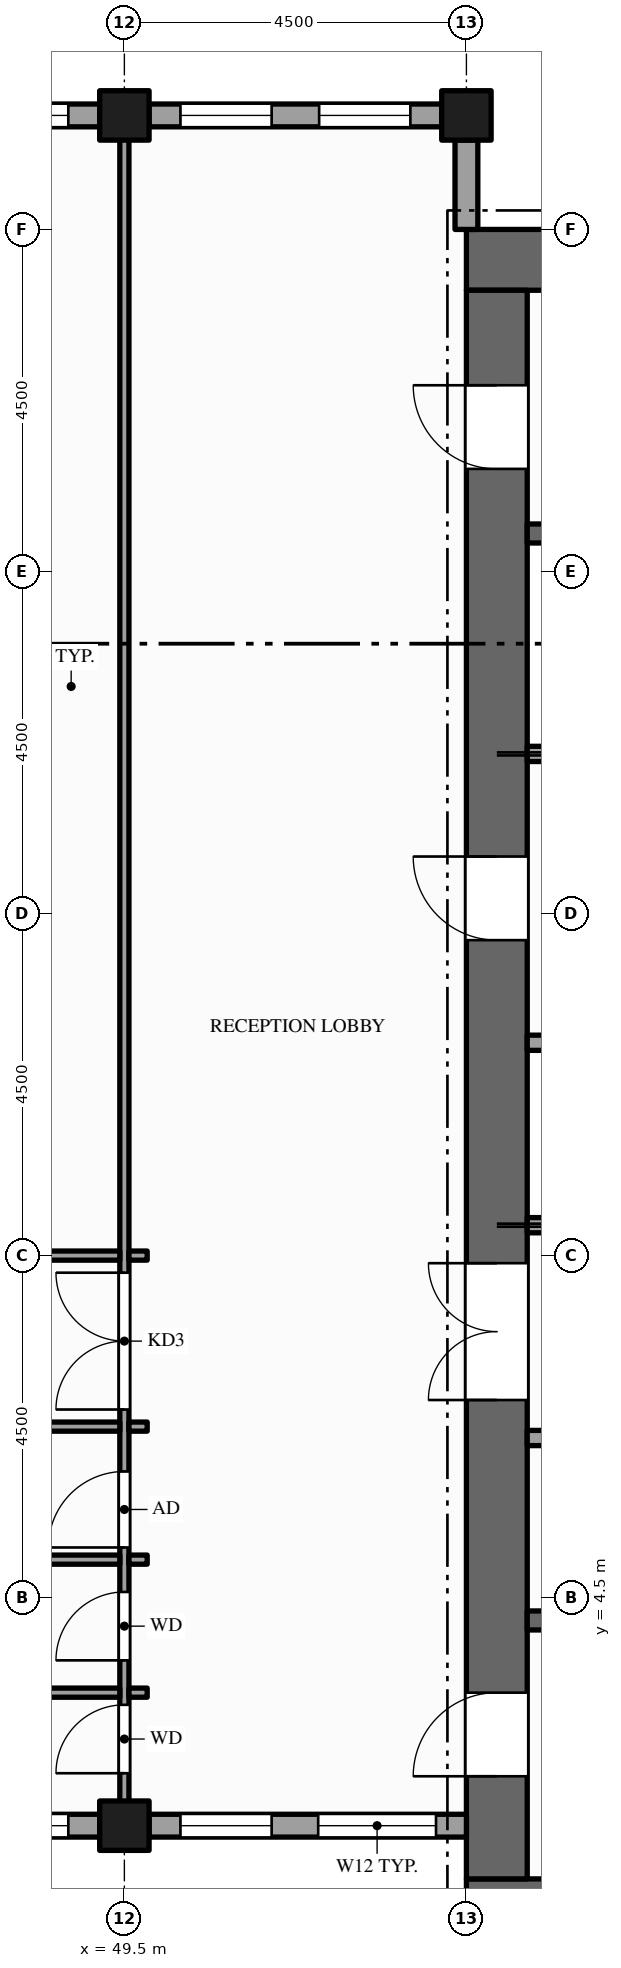
"""IFC4 building model, lengths in metres.
Left out: names, types, materials, properties, quantities, classifications, styles, units other than length and angle.
Written with IfcOpenShell. Run it as: python <this file> out.ifc"""

import sys

from ifc_helpers import new_model, si_unit, direction, frame, frame_2d, origin, origin_2d, place, context, subcontext, project, spatial, rectangle, hollow_rectangle, extrude, element, fill, save


model = new_model("IFC4")
c1 = context("Model", 3, precision=1e-05, world=origin(), true_north=direction((0.0, 1.0)))
c2 = subcontext(c1, "Body", "Model", "MODEL_VIEW")
j1 = project(units=[si_unit("LENGTHUNIT", "METRE"), si_unit("PLANEANGLEUNIT", "RADIAN")], contexts=[c1])
p1 = place(None, origin())
s1 = spatial("IfcSite", under=j1, at=p1, CompositionType="ELEMENT")
p2 = place(p1, origin())
s2 = spatial("IfcBuilding", under=s1, at=p2, CompositionType="ELEMENT")
p3 = place(p2, frame((0.0, 0.0, 269.0)))
s3 = spatial("IfcBuildingStorey", under=s2, at=p3, CompositionType="ELEMENT", Elevation=269.0)
for number, where, z_axis, x_axis in (
    (1, (67.5, 0.4, -0.15), (0.0, 0.0, 1.0), (-1.0, 0.0, 0.0)),
    (2, (54.0, 22.1, -0.15), (0.0, 0.0, 1.0), (1.0, 0.0, 0.0)),
):
    element("IfcWall", number, at=place(p3, frame(where, z_axis=z_axis, x_axis=x_axis)), inside=s3, PredefinedType="SHEAR", context=c2, shape_type="SweptSolid", body=[
        extrude(rectangle(XDim=13.5, YDim=0.8, at=frame_2d((6.75, 0.0))), origin(), (0.0, 0.0, 1.0), 4.0),
    ])
p4 = place(p3, frame((54.4, 0.8, -0.15), z_axis=(0.0, 0.0, 1.0), x_axis=(0.0, 1.0, 0.0)))
e3 = element("IfcWall", 3, at=p4, inside=s3, PredefinedType="SHEAR", context=c2, shape_type="SweptSolid", body=[
    extrude(rectangle(XDim=20.9, YDim=0.8, at=frame_2d((10.45, 0.0))), origin(), (0.0, 0.0, 1.0), 4.0),
])
p5 = place(p4, frame((6.3, 0.0, 0.15)))
e4 = element("IfcOpeningElement", 4, at=p5, cuts=e3, PredefinedType="OPENING", context=c2, shape_type="SweptSolid", body=[
    extrude(rectangle(XDim=1.8, YDim=2.1, at=frame_2d((0.9, 1.05))), frame((0.0, 0.41, 0.0), z_axis=(0.0, -1.0, 0.0), x_axis=(1.0, 0.0, 0.0)), (0.0, 0.0, 1.0), 0.82),
])
p6 = place(p4, frame((12.35, 0.0, 0.15)))
e5 = element("IfcOpeningElement", 5, at=p6, cuts=e3, PredefinedType="OPENING", context=c2, shape_type="SweptSolid", body=[
    extrude(rectangle(XDim=1.1, YDim=2.1, at=frame_2d((0.55, 1.05))), frame((0.0, 0.41, 0.0), z_axis=(0.0, -1.0, 0.0), x_axis=(1.0, 0.0, 0.0)), (0.0, 0.0, 1.0), 0.82),
])
p7 = place(p4, frame((1.35, 0.0, 0.15)))
e6 = element("IfcOpeningElement", 6, at=p7, cuts=e3, PredefinedType="OPENING", context=c2, shape_type="SweptSolid", body=[
    extrude(rectangle(XDim=1.1, YDim=2.1, at=frame_2d((0.55, 1.05))), frame((0.0, 0.41, 0.0), z_axis=(0.0, -1.0, 0.0), x_axis=(1.0, 0.0, 0.0)), (0.0, 0.0, 1.0), 0.82),
])
p8 = place(p4, frame((18.55, 0.0, 0.15)))
e7 = element("IfcOpeningElement", 7, at=p8, cuts=e3, PredefinedType="OPENING", context=c2, shape_type="SweptSolid", body=[
    extrude(rectangle(XDim=1.1, YDim=2.1, at=frame_2d((0.55, 1.05))), frame((0.0, 0.41, 0.0), z_axis=(0.0, -1.0, 0.0), x_axis=(1.0, 0.0, 0.0)), (0.0, 0.0, 1.0), 0.82),
])
for number, where, z_axis, x_axis in (
    (8, (49.5, 1.5, -0.15), (0.0, 0.0, 1.0), (1.0, 0.0, 0.0)),
    (9, (49.5, 24.0, -0.15), (0.0, 0.0, 1.0), (1.0, 0.0, 0.0)),
    (10, (54.0, 24.0, -0.15), (0.0, 0.0, 1.0), (1.0, 0.0, 0.0)),
):
    element("IfcColumn", number, at=place(p3, frame(where, z_axis=z_axis, x_axis=x_axis)), inside=s3, PredefinedType="COLUMN", context=c2, shape_type="SweptSolid", body=[
        extrude(hollow_rectangle(XDim=0.65, YDim=0.65, WallThickness=0.032, at=origin_2d()), origin(), (0.0, 0.0, 1.0), 4.0),
    ])
p9 = place(p3, frame((45.325, 1.5, 0.0), z_axis=(0.0, 0.0, 1.0), x_axis=(1.0, 0.0, 0.0)))
e11 = element("IfcWall", 11, at=p9, inside=s3, PredefinedType="STANDARD", context=c2, shape_type="SweptSolid", body=[
    extrude(rectangle(XDim=3.85, YDim=0.3, at=frame_2d((1.925, 0.0))), origin(), (0.0, 0.0, 1.0), 2.87),
])
p10 = place(p9, frame((0.413, 0.0, 0.9)))
e12 = element("IfcOpeningElement", 12, at=p10, cuts=e11, PredefinedType="OPENING", context=c2, shape_type="SweptSolid", body=[
    extrude(rectangle(XDim=1.2, YDim=1.75, at=frame_2d((0.6, 0.875))), frame((0.0, 0.16, 0.0), z_axis=(0.0, -1.0, 0.0), x_axis=(1.0, 0.0, 0.0)), (0.0, 0.0, 1.0), 0.32),
])
p11 = place(p9, frame((2.238, 0.0, 0.9)))
e13 = element("IfcOpeningElement", 13, at=p11, cuts=e11, PredefinedType="OPENING", context=c2, shape_type="SweptSolid", body=[
    extrude(rectangle(XDim=1.2, YDim=1.75, at=frame_2d((0.6, 0.875))), frame((0.0, 0.16, 0.0), z_axis=(0.0, -1.0, 0.0), x_axis=(1.0, 0.0, 0.0)), (0.0, 0.0, 1.0), 0.32),
])
p12 = place(p3, frame((49.825, 1.5, 0.0), z_axis=(0.0, 0.0, 1.0), x_axis=(1.0, 0.0, 0.0)))
e14 = element("IfcWall", 14, at=p12, inside=s3, PredefinedType="STANDARD", context=c2, shape_type="SweptSolid", body=[
    extrude(rectangle(XDim=4.175, YDim=0.3, at=frame_2d((2.087, 0.0))), origin(), (0.0, 0.0, 1.0), 2.87),
])
p13 = place(p12, frame((0.413, 0.0, 0.9)))
e15 = element("IfcOpeningElement", 15, at=p13, cuts=e14, PredefinedType="OPENING", context=c2, shape_type="SweptSolid", body=[
    extrude(rectangle(XDim=1.2, YDim=1.75, at=frame_2d((0.6, 0.875))), frame((0.0, 0.16, 0.0), z_axis=(0.0, -1.0, 0.0), x_axis=(1.0, 0.0, 0.0)), (0.0, 0.0, 1.0), 0.32),
])
p14 = place(p12, frame((2.225, 0.0, 0.9)))
e16 = element("IfcOpeningElement", 16, at=p14, cuts=e14, PredefinedType="OPENING", context=c2, shape_type="SweptSolid", body=[
    extrude(rectangle(XDim=1.55, YDim=1.75, at=frame_2d((0.775, 0.875))), frame((0.0, 0.16, 0.0), z_axis=(0.0, -1.0, 0.0), x_axis=(1.0, 0.0, 0.0)), (0.0, 0.0, 1.0), 0.32),
])
p15 = place(p3, frame((54.0, 22.5, 0.0), z_axis=(0.0, 0.0, 1.0), x_axis=(0.0, 1.0, 0.0)))
e17 = element("IfcWall", 17, at=p15, inside=s3, PredefinedType="STANDARD", context=c2, shape_type="SweptSolid", body=[
    extrude(rectangle(XDim=1.175, YDim=0.3, at=frame_2d((0.587, 0.0))), origin(), (0.0, 0.0, 1.0), 3.162),
])
p16 = place(p3, frame((53.675, 24.0, 0.0), z_axis=(0.0, 0.0, 1.0), x_axis=(-1.0, 0.0, 0.0)))
e18 = element("IfcWall", 18, at=p16, inside=s3, PredefinedType="STANDARD", context=c2, shape_type="SweptSolid", body=[
    extrude(rectangle(XDim=3.85, YDim=0.3, at=frame_2d((1.925, 0.0))), origin(), (0.0, 0.0, 1.0), 2.87),
])
p17 = place(p16, frame((0.413, 0.0, 0.9)))
e19 = element("IfcOpeningElement", 19, at=p17, cuts=e18, PredefinedType="OPENING", context=c2, shape_type="SweptSolid", body=[
    extrude(rectangle(XDim=1.2, YDim=1.75, at=frame_2d((0.6, 0.875))), frame((0.0, 0.16, 0.0), z_axis=(0.0, -1.0, 0.0), x_axis=(1.0, 0.0, 0.0)), (0.0, 0.0, 1.0), 0.32),
])
p18 = place(p16, frame((2.238, 0.0, 0.9)))
e20 = element("IfcOpeningElement", 20, at=p18, cuts=e18, PredefinedType="OPENING", context=c2, shape_type="SweptSolid", body=[
    extrude(rectangle(XDim=1.2, YDim=1.75, at=frame_2d((0.6, 0.875))), frame((0.0, 0.16, 0.0), z_axis=(0.0, -1.0, 0.0), x_axis=(1.0, 0.0, 0.0)), (0.0, 0.0, 1.0), 0.32),
])
p19 = place(p3, frame((49.175, 24.0, 0.0), z_axis=(0.0, 0.0, 1.0), x_axis=(-1.0, 0.0, 0.0)))
e21 = element("IfcWall", 21, at=p19, inside=s3, PredefinedType="STANDARD", context=c2, shape_type="SweptSolid", body=[
    extrude(rectangle(XDim=3.85, YDim=0.3, at=frame_2d((1.925, 0.0))), origin(), (0.0, 0.0, 1.0), 2.87),
])
p20 = place(p19, frame((0.413, 0.0, 0.9)))
e22 = element("IfcOpeningElement", 22, at=p20, cuts=e21, PredefinedType="OPENING", context=c2, shape_type="SweptSolid", body=[
    extrude(rectangle(XDim=1.2, YDim=1.75, at=frame_2d((0.6, 0.875))), frame((0.0, 0.16, 0.0), z_axis=(0.0, -1.0, 0.0), x_axis=(1.0, 0.0, 0.0)), (0.0, 0.0, 1.0), 0.32),
])
p21 = place(p19, frame((2.238, 0.0, 0.9)))
e23 = element("IfcOpeningElement", 23, at=p21, cuts=e21, PredefinedType="OPENING", context=c2, shape_type="SweptSolid", body=[
    extrude(rectangle(XDim=1.2, YDim=1.75, at=frame_2d((0.6, 0.875))), frame((0.0, 0.16, 0.0), z_axis=(0.0, -1.0, 0.0), x_axis=(1.0, 0.0, 0.0)), (0.0, 0.0, 1.0), 0.32),
])
p22 = place(p3, frame((49.5, 1.65, 0.0), z_axis=(0.0, 0.0, 1.0), x_axis=(0.0, 1.0, 0.0)))
e24 = element("IfcWall", 24, at=p22, inside=s3, PredefinedType="PARTITIONING", context=c2, shape_type="SweptSolid", body=[
    extrude(rectangle(XDim=22.2, YDim=0.12, at=frame_2d((11.1, 0.0))), origin(), (0.0, 0.0, 1.0), 2.87),
])
p23 = place(p22, frame((5.325, 0.0, 0.0)))
e25 = element("IfcOpeningElement", 25, at=p23, cuts=e24, PredefinedType="OPENING", context=c2, shape_type="SweptSolid", body=[
    extrude(rectangle(XDim=1.8, YDim=2.1, at=frame_2d((0.9, 1.05))), frame((0.0, 0.07, 0.0), z_axis=(0.0, -1.0, 0.0), x_axis=(1.0, 0.0, 0.0)), (0.0, 0.0, 1.0), 0.14),
])
p24 = place(p22, frame((0.54, 0.0, 0.0)))
e26 = element("IfcOpeningElement", 26, at=p24, cuts=e24, PredefinedType="OPENING", context=c2, shape_type="SweptSolid", body=[
    extrude(rectangle(XDim=0.9, YDim=2.1, at=frame_2d((0.45, 1.05))), frame((0.0, 0.07, 0.0), z_axis=(0.0, -1.0, 0.0), x_axis=(1.0, 0.0, 0.0)), (0.0, 0.0, 1.0), 0.14),
])
p25 = place(p22, frame((2.025, 0.0, 0.0)))
e27 = element("IfcOpeningElement", 27, at=p25, cuts=e24, PredefinedType="OPENING", context=c2, shape_type="SweptSolid", body=[
    extrude(rectangle(XDim=0.9, YDim=2.1, at=frame_2d((0.45, 1.05))), frame((0.0, 0.07, 0.0), z_axis=(0.0, -1.0, 0.0), x_axis=(1.0, 0.0, 0.0)), (0.0, 0.0, 1.0), 0.14),
])
p26 = place(p22, frame((3.51, 0.0, 0.0)))
e28 = element("IfcOpeningElement", 28, at=p26, cuts=e24, PredefinedType="OPENING", context=c2, shape_type="SweptSolid", body=[
    extrude(rectangle(XDim=1.0, YDim=2.1, at=frame_2d((0.5, 1.05))), frame((0.0, 0.07, 0.0), z_axis=(0.0, -1.0, 0.0), x_axis=(1.0, 0.0, 0.0)), (0.0, 0.0, 1.0), 0.14),
])
p27 = place(p3, frame((45.06, 3.25, 0.0), z_axis=(0.0, 0.0, 1.0), x_axis=(1.0, 0.0, 0.0)))
e29 = element("IfcWall", 29, at=p27, inside=s3, PredefinedType="PARTITIONING", context=c2, shape_type="SweptSolid", body=[
    extrude(rectangle(XDim=4.38, YDim=0.12, at=frame_2d((2.19, 0.0))), origin(), (0.0, 0.0, 1.0), 2.87),
])
p28 = place(p3, frame((49.56, 3.25, 0.0), z_axis=(0.0, 0.0, 1.0), x_axis=(1.0, 0.0, 0.0)))
e30 = element("IfcWall", 30, at=p28, inside=s3, PredefinedType="PARTITIONING", context=c2, shape_type="SweptSolid", body=[
    extrude(rectangle(XDim=0.24, YDim=0.12, at=frame_2d((0.12, 0.0))), origin(), (0.0, 0.0, 1.0), 2.87),
])
p29 = place(p3, frame((54.8, 4.2, 0.0), z_axis=(0.0, 0.0, 1.0), x_axis=(1.0, 0.0, 0.0)))
e31 = element("IfcWall", 31, at=p29, inside=s3, PredefinedType="SHEAR", context=c2, shape_type="SweptSolid", body=[
    extrude(rectangle(XDim=6.475, YDim=0.25, at=frame_2d((3.237, 0.0))), origin(), (0.0, 0.0, 1.0), 3.85),
])
p30 = place(p3, frame((45.06, 5.0, 0.0), z_axis=(0.0, 0.0, 1.0), x_axis=(1.0, 0.0, 0.0)))
e32 = element("IfcWall", 32, at=p30, inside=s3, PredefinedType="PARTITIONING", context=c2, shape_type="SweptSolid", body=[
    extrude(rectangle(XDim=4.38, YDim=0.12, at=frame_2d((2.19, 0.0))), origin(), (0.0, 0.0, 1.0), 2.87),
])
p31 = place(p3, frame((49.56, 5.0, 0.0), z_axis=(0.0, 0.0, 1.0), x_axis=(1.0, 0.0, 0.0)))
e33 = element("IfcWall", 33, at=p31, inside=s3, PredefinedType="PARTITIONING", context=c2, shape_type="SweptSolid", body=[
    extrude(rectangle(XDim=0.24, YDim=0.12, at=frame_2d((0.12, 0.0))), origin(), (0.0, 0.0, 1.0), 2.87),
])
p32 = place(p3, frame((54.8, 6.6, 0.0), z_axis=(0.0, 0.0, 1.0), x_axis=(1.0, 0.0, 0.0)))
e34 = element("IfcWall", 34, at=p32, inside=s3, PredefinedType="PARTITIONING", context=c2, shape_type="SweptSolid", body=[
    extrude(rectangle(XDim=2.5, YDim=0.2, at=frame_2d((1.25, 0.0))), origin(), (0.0, 0.0, 1.0), 3.85),
])
p33 = place(p32, frame((0.8, 0.0, 0.0)))
e35 = element("IfcOpeningElement", 35, at=p33, cuts=e34, PredefinedType="OPENING", context=c2, shape_type="SweptSolid", body=[
    extrude(rectangle(XDim=0.9, YDim=2.1, at=frame_2d((0.45, 1.05))), frame((0.0, 0.11, 0.0), z_axis=(0.0, -1.0, 0.0), x_axis=(1.0, 0.0, 0.0)), (0.0, 0.0, 1.0), 0.22),
])
p34 = place(p3, frame((45.06, 6.75, 0.0), z_axis=(0.0, 0.0, 1.0), x_axis=(1.0, 0.0, 0.0)))
e36 = element("IfcWall", 36, at=p34, inside=s3, PredefinedType="PARTITIONING", context=c2, shape_type="SweptSolid", body=[
    extrude(rectangle(XDim=4.38, YDim=0.12, at=frame_2d((2.19, 0.0))), origin(), (0.0, 0.0, 1.0), 2.87),
])
p35 = place(p3, frame((49.56, 6.75, 0.0), z_axis=(0.0, 0.0, 1.0), x_axis=(1.0, 0.0, 0.0)))
e37 = element("IfcWall", 37, at=p35, inside=s3, PredefinedType="PARTITIONING", context=c2, shape_type="SweptSolid", body=[
    extrude(rectangle(XDim=0.24, YDim=0.12, at=frame_2d((0.12, 0.0))), origin(), (0.0, 0.0, 1.0), 2.87),
])
p36 = place(p3, frame((42.81, 9.0, 0.0), z_axis=(0.0, 0.0, 1.0), x_axis=(1.0, 0.0, 0.0)))
e38 = element("IfcWall", 38, at=p36, inside=s3, PredefinedType="PARTITIONING", context=c2, shape_type="SweptSolid", body=[
    extrude(rectangle(XDim=6.63, YDim=0.12, at=frame_2d((3.315, 0.0))), origin(), (0.0, 0.0, 1.0), 2.87),
])
p37 = place(p36, frame((2.815, 0.0, 0.0)))
e39 = element("IfcOpeningElement", 39, at=p37, cuts=e38, PredefinedType="OPENING", context=c2, shape_type="SweptSolid", body=[
    extrude(rectangle(XDim=1.0, YDim=2.1, at=frame_2d((0.5, 1.05))), frame((0.0, 0.07, 0.0), z_axis=(0.0, -1.0, 0.0), x_axis=(1.0, 0.0, 0.0)), (0.0, 0.0, 1.0), 0.14),
])
p38 = place(p3, frame((49.56, 9.0, 0.0), z_axis=(0.0, 0.0, 1.0), x_axis=(1.0, 0.0, 0.0)))
e40 = element("IfcWall", 40, at=p38, inside=s3, PredefinedType="PARTITIONING", context=c2, shape_type="SweptSolid", body=[
    extrude(rectangle(XDim=0.24, YDim=0.12, at=frame_2d((0.12, 0.0))), origin(), (0.0, 0.0, 1.0), 2.87),
])
p39 = place(p3, frame((54.8, 9.4, 0.0), z_axis=(0.0, 0.0, 1.0), x_axis=(1.0, 0.0, 0.0)))
e41 = element("IfcWall", 41, at=p39, inside=s3, PredefinedType="SOLIDWALL", context=c2, shape_type="SweptSolid", body=[
    extrude(rectangle(XDim=2.5, YDim=0.2, at=frame_2d((1.25, 0.0))), origin(), (0.0, 0.0, 1.0), 3.85),
])
p40 = place(p39, frame((0.7, 0.0, 0.012)))
e42 = element("IfcOpeningElement", 42, at=p40, cuts=e41, PredefinedType="OPENING", context=c2, shape_type="SweptSolid", body=[
    extrude(rectangle(XDim=1.1, YDim=2.1, at=frame_2d((0.55, 1.05))), frame((0.0, 0.11, 0.0), z_axis=(0.0, -1.0, 0.0), x_axis=(1.0, 0.0, 0.0)), (0.0, 0.0, 1.0), 0.22),
])
p41 = place(p3, frame((54.8, 11.8, 0.0), z_axis=(0.0, 0.0, 1.0), x_axis=(1.0, 0.0, 0.0)))
e43 = element("IfcWall", 43, at=p41, inside=s3, PredefinedType="SOLIDWALL", context=c2, shape_type="SweptSolid", body=[
    extrude(rectangle(XDim=2.5, YDim=0.2, at=frame_2d((1.25, 0.0))), origin(), (0.0, 0.0, 1.0), 3.85),
])
p42 = place(p3, frame((54.8, 15.6, 0.0), z_axis=(0.0, 0.0, 1.0), x_axis=(1.0, 0.0, 0.0)))
e44 = element("IfcWall", 44, at=p42, inside=s3, PredefinedType="SOLIDWALL", context=c2, shape_type="SweptSolid", body=[
    extrude(rectangle(XDim=2.5, YDim=0.2, at=frame_2d((1.25, 0.0))), origin(), (0.0, 0.0, 1.0), 3.85),
])
p43 = place(p42, frame((0.7, 0.0, 0.012)))
e45 = element("IfcOpeningElement", 45, at=p43, cuts=e44, PredefinedType="OPENING", context=c2, shape_type="SweptSolid", body=[
    extrude(rectangle(XDim=1.1, YDim=2.1, at=frame_2d((0.55, 1.05))), frame((0.0, 0.11, 0.0), z_axis=(0.0, -1.0, 0.0), x_axis=(1.0, 0.0, 0.0)), (0.0, 0.0, 1.0), 0.22),
])
p44 = place(p3, frame((54.8, 18.5, 0.0), z_axis=(0.0, 0.0, 1.0), x_axis=(1.0, 0.0, 0.0)))
e46 = element("IfcWall", 46, at=p44, inside=s3, PredefinedType="SHEAR", context=c2, shape_type="SweptSolid", body=[
    extrude(rectangle(XDim=6.475, YDim=0.25, at=frame_2d((3.237, 0.0))), origin(), (0.0, 0.0, 1.0), 3.85),
])
p45 = place(p11, origin())
e47 = element("IfcWindow", 47, at=p45, inside=s3, PartitioningType="SINGLE_PANEL", PredefinedType="WINDOW", context=c2, shape_type="SweptSolid", body=[
    extrude(rectangle(XDim=1.2, YDim=1.75, at=frame_2d((0.6, 0.875))), frame((0.0, 0.03, 0.0), z_axis=(0.0, -1.0, 0.0), x_axis=(1.0, 0.0, 0.0)), (0.0, 0.0, 1.0), 0.06),
])
fill(e13, e47)
p46 = place(p13, origin())
e48 = element("IfcWindow", 48, at=p46, inside=s3, PartitioningType="SINGLE_PANEL", PredefinedType="WINDOW", context=c2, shape_type="SweptSolid", body=[
    extrude(rectangle(XDim=1.2, YDim=1.75, at=frame_2d((0.6, 0.875))), frame((0.0, 0.03, 0.0), z_axis=(0.0, -1.0, 0.0), x_axis=(1.0, 0.0, 0.0)), (0.0, 0.0, 1.0), 0.06),
])
fill(e15, e48)
p47 = place(p14, origin())
e49 = element("IfcWindow", 49, at=p47, inside=s3, PartitioningType="SINGLE_PANEL", PredefinedType="WINDOW", context=c2, shape_type="SweptSolid", body=[
    extrude(rectangle(XDim=1.55, YDim=1.75, at=frame_2d((0.775, 0.875))), frame((0.0, 0.03, 0.0), z_axis=(0.0, -1.0, 0.0), x_axis=(1.0, 0.0, 0.0)), (0.0, 0.0, 1.0), 0.06),
])
fill(e16, e49)
p48 = place(p17, origin())
e50 = element("IfcWindow", 50, at=p48, inside=s3, PartitioningType="SINGLE_PANEL", PredefinedType="WINDOW", context=c2, shape_type="SweptSolid", body=[
    extrude(rectangle(XDim=1.2, YDim=1.75, at=frame_2d((0.6, 0.875))), frame((0.0, 0.03, 0.0), z_axis=(0.0, -1.0, 0.0), x_axis=(1.0, 0.0, 0.0)), (0.0, 0.0, 1.0), 0.06),
])
fill(e19, e50)
p49 = place(p18, origin())
e51 = element("IfcWindow", 51, at=p49, inside=s3, PartitioningType="SINGLE_PANEL", PredefinedType="WINDOW", context=c2, shape_type="SweptSolid", body=[
    extrude(rectangle(XDim=1.2, YDim=1.75, at=frame_2d((0.6, 0.875))), frame((0.0, 0.03, 0.0), z_axis=(0.0, -1.0, 0.0), x_axis=(1.0, 0.0, 0.0)), (0.0, 0.0, 1.0), 0.06),
])
fill(e20, e51)
p50 = place(p20, origin())
e52 = element("IfcWindow", 52, at=p50, inside=s3, PartitioningType="SINGLE_PANEL", PredefinedType="WINDOW", context=c2, shape_type="SweptSolid", body=[
    extrude(rectangle(XDim=1.2, YDim=1.75, at=frame_2d((0.6, 0.875))), frame((0.0, 0.03, 0.0), z_axis=(0.0, -1.0, 0.0), x_axis=(1.0, 0.0, 0.0)), (0.0, 0.0, 1.0), 0.06),
])
fill(e22, e52)
p51 = place(p5, origin())
e53 = element("IfcDoor", 53, at=p51, inside=s3, OperationType="DOUBLE_DOOR_SINGLE_SWING", PredefinedType="DOOR", context=c2, shape_type="SweptSolid", body=[
    extrude(rectangle(XDim=1.8, YDim=2.1, at=frame_2d((0.9, 1.05))), frame((0.0, 0.025, 0.0), z_axis=(0.0, -1.0, 0.0), x_axis=(1.0, 0.0, 0.0)), (0.0, 0.0, 1.0), 0.05),
])
fill(e4, e53)
p52 = place(p6, origin())
e54 = element("IfcDoor", 54, at=p52, inside=s3, OperationType="SINGLE_SWING_RIGHT", PredefinedType="DOOR", context=c2, shape_type="SweptSolid", body=[
    extrude(rectangle(XDim=1.1, YDim=2.1, at=frame_2d((0.55, 1.05))), frame((0.0, 0.025, 0.0), z_axis=(0.0, -1.0, 0.0), x_axis=(1.0, 0.0, 0.0)), (0.0, 0.0, 1.0), 0.05),
])
fill(e5, e54)
p53 = place(p7, origin())
e55 = element("IfcDoor", 55, at=p53, inside=s3, OperationType="SINGLE_SWING_LEFT", PredefinedType="DOOR", context=c2, shape_type="SweptSolid", body=[
    extrude(rectangle(XDim=1.1, YDim=2.1, at=frame_2d((0.55, 1.05))), frame((0.0, 0.025, 0.0), z_axis=(0.0, -1.0, 0.0), x_axis=(1.0, 0.0, 0.0)), (0.0, 0.0, 1.0), 0.05),
])
fill(e6, e55)
p54 = place(p8, origin())
e56 = element("IfcDoor", 56, at=p54, inside=s3, OperationType="SINGLE_SWING_RIGHT", PredefinedType="DOOR", context=c2, shape_type="SweptSolid", body=[
    extrude(rectangle(XDim=1.1, YDim=2.1, at=frame_2d((0.55, 1.05))), frame((0.0, 0.025, 0.0), z_axis=(0.0, -1.0, 0.0), x_axis=(1.0, 0.0, 0.0)), (0.0, 0.0, 1.0), 0.05),
])
fill(e7, e56)
p55 = place(p23, origin())
e57 = element("IfcDoor", 57, at=p55, inside=s3, OperationType="DOUBLE_DOOR_SINGLE_SWING", PredefinedType="DOOR", context=c2, shape_type="SweptSolid", body=[
    extrude(rectangle(XDim=1.8, YDim=2.1, at=frame_2d((0.9, 1.05))), frame((0.0, 0.025, 0.0), z_axis=(0.0, -1.0, 0.0), x_axis=(1.0, 0.0, 0.0)), (0.0, 0.0, 1.0), 0.05),
])
fill(e25, e57)
p56 = place(p24, origin())
e58 = element("IfcDoor", 58, at=p56, inside=s3, OperationType="SINGLE_SWING_LEFT", PredefinedType="DOOR", context=c2, shape_type="SweptSolid", body=[
    extrude(rectangle(XDim=0.9, YDim=2.1, at=frame_2d((0.45, 1.05))), frame((0.0, 0.025, 0.0), z_axis=(0.0, -1.0, 0.0), x_axis=(1.0, 0.0, 0.0)), (0.0, 0.0, 1.0), 0.05),
])
fill(e26, e58)
p57 = place(p25, origin())
e59 = element("IfcDoor", 59, at=p57, inside=s3, OperationType="SINGLE_SWING_LEFT", PredefinedType="DOOR", context=c2, shape_type="SweptSolid", body=[
    extrude(rectangle(XDim=0.9, YDim=2.1, at=frame_2d((0.45, 1.05))), frame((0.0, 0.025, 0.0), z_axis=(0.0, -1.0, 0.0), x_axis=(1.0, 0.0, 0.0)), (0.0, 0.0, 1.0), 0.05),
])
fill(e27, e59)
p58 = place(p26, origin())
e60 = element("IfcDoor", 60, at=p58, inside=s3, OperationType="SINGLE_SWING_LEFT", PredefinedType="DOOR", context=c2, shape_type="SweptSolid", body=[
    extrude(rectangle(XDim=1.0, YDim=2.1, at=frame_2d((0.5, 1.05))), frame((0.0, 0.025, 0.0), z_axis=(0.0, -1.0, 0.0), x_axis=(1.0, 0.0, 0.0)), (0.0, 0.0, 1.0), 0.05),
])
fill(e28, e60)
save(model, sys.argv[1])
